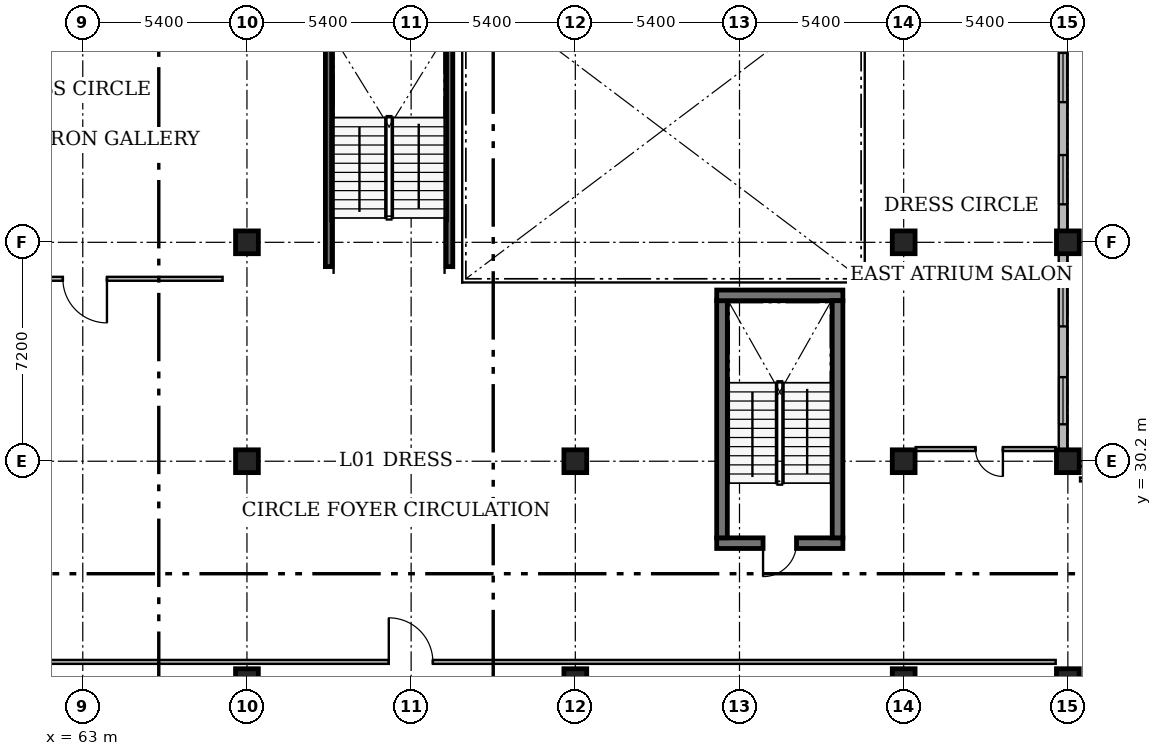
"""IFC4 building model, lengths in metres.
Left out: names, types, materials, properties, quantities, classifications, styles, units other than length and angle.
Written with IfcOpenShell. Run it as: python <this file> out.ifc"""

import sys

from ifc_helpers import new_model, si_unit, direction, frame, frame_2d, origin, origin_2d, place, context, subcontext, project, spatial, rectangle, circle, extrude, element, fill, save


model = new_model("IFC4")
c1 = context("Model", 3, precision=1e-05, world=origin(), true_north=direction((0.0, 1.0)))
c2 = subcontext(c1, "Body", "Model", "MODEL_VIEW")
j1 = project(units=[si_unit("LENGTHUNIT", "METRE"), si_unit("PLANEANGLEUNIT", "RADIAN")], contexts=[c1])
p1 = place(None, origin())
s1 = spatial("IfcSite", under=j1, at=p1, CompositionType="ELEMENT")
p2 = place(p1, origin())
s2 = spatial("IfcBuilding", under=s1, at=p2, CompositionType="ELEMENT")
p3 = place(p2, frame((0.0, 0.0, 4.8)))
s3 = spatial("IfcBuildingStorey", under=s2, at=p3, CompositionType="ELEMENT", Elevation=4.8)
for number, where, z_axis, x_axis in (
    (1, (68.4, 23.0, 0.0), (0.0, 0.0, 1.0), (1.0, 0.0, 0.0)),
    (2, (68.4, 30.2, 0.0), (0.0, 0.0, 1.0), (1.0, 0.0, 0.0)),
    (3, (68.4, 37.4, 0.0), (0.0, 0.0, 1.0), (1.0, 0.0, 0.0)),
    (4, (79.2, 23.0, 0.0), (0.0, 0.0, 1.0), (1.0, 0.0, 0.0)),
    (5, (79.2, 30.2, 0.0), (0.0, 0.0, 1.0), (1.0, 0.0, 0.0)),
    (6, (90.0, 23.0, 0.0), (0.0, 0.0, 1.0), (1.0, 0.0, 0.0)),
    (7, (90.0, 30.2, 0.0), (0.0, 0.0, 1.0), (1.0, 0.0, 0.0)),
    (8, (90.0, 37.4, 0.0), (0.0, 0.0, 1.0), (1.0, 0.0, 0.0)),
    (9, (95.4, 23.0, 0.0), (0.0, 0.0, 1.0), (1.0, 0.0, 0.0)),
    (10, (95.4, 30.2, 0.0), (0.0, 0.0, 1.0), (1.0, 0.0, 0.0)),
    (11, (95.4, 37.4, 0.0), (0.0, 0.0, 1.0), (1.0, 0.0, 0.0)),
):
    element("IfcColumn", number, at=place(p3, frame(where, z_axis=z_axis, x_axis=x_axis)), inside=s3, PredefinedType="COLUMN", context=c2, shape_type="SweptSolid", body=[
        extrude(circle(Radius=0.375, at=origin_2d()), origin(), (0.0, 0.0, 1.0), 4.2),
    ])
p4 = place(p3, frame((88.0, 27.505, 0.0), z_axis=(0.0, 0.0, 1.0), x_axis=(-1.0, 0.0, 0.0)))
e12 = element("IfcWall", 12, at=p4, inside=s3, PredefinedType="SOLIDWALL", context=c2, shape_type="SweptSolid", body=[
    extrude(rectangle(XDim=4.15, YDim=0.35, at=frame_2d((2.075, 0.0))), origin(), (0.0, 0.0, 1.0), 4.2),
])
p5 = place(p4, frame((1.525, 0.0, 0.0)))
e13 = element("IfcOpeningElement", 13, at=p5, cuts=e12, PredefinedType="OPENING", context=c2, shape_type="SweptSolid", body=[
    extrude(rectangle(XDim=1.1, YDim=2.15, at=frame_2d((0.55, 1.075))), frame((0.0, 0.195, 0.0), z_axis=(0.0, -1.0, 0.0), x_axis=(1.0, 0.0, 0.0)), (0.0, 0.0, 1.0), 0.39),
])
p6 = place(p3, frame((84.025, 27.68, 0.0), z_axis=(0.0, 0.0, 1.0), x_axis=(0.0, 1.0, 0.0)))
e14 = element("IfcWall", 14, at=p6, inside=s3, PredefinedType="SOLIDWALL", context=c2, shape_type="SweptSolid", body=[
    extrude(rectangle(XDim=7.8, YDim=0.35, at=frame_2d((3.9, 0.0))), origin(), (0.0, 0.0, 1.0), 4.2),
])
p7 = place(p3, frame((83.85, 35.655, 0.0), z_axis=(0.0, 0.0, 1.0), x_axis=(1.0, 0.0, 0.0)))
e15 = element("IfcWall", 15, at=p7, inside=s3, PredefinedType="SOLIDWALL", context=c2, shape_type="SweptSolid", body=[
    extrude(rectangle(XDim=4.15, YDim=0.35, at=frame_2d((2.075, 0.0))), origin(), (0.0, 0.0, 1.0), 4.2),
])
p8 = place(p3, frame((87.825, 35.48, 0.0), z_axis=(0.0, 0.0, 1.0), x_axis=(0.0, -1.0, 0.0)))
e16 = element("IfcWall", 16, at=p8, inside=s3, PredefinedType="SOLIDWALL", context=c2, shape_type="SweptSolid", body=[
    extrude(rectangle(XDim=7.8, YDim=0.35, at=frame_2d((3.9, 0.0))), origin(), (0.0, 0.0, 1.0), 4.2),
])
for number, where, z_axis, x_axis in (
    (17, (71.09, 36.6, 0.0), (0.0, 0.0, 1.0), (0.0, 1.0, 0.0)),
    (18, (75.06, 36.6, 0.0), (0.0, 0.0, 1.0), (0.0, 1.0, 0.0)),
):
    element("IfcWall", number, at=place(p3, frame(where, z_axis=z_axis, x_axis=x_axis)), inside=s3, PredefinedType="SOLIDWALL", context=c2, shape_type="SweptSolid", body=[
        extrude(rectangle(XDim=7.6, YDim=0.22, at=frame_2d((3.8, 0.0))), origin(), (0.0, 0.0, 1.0), 3.95),
    ])
p9 = place(p3, frame((95.24, 30.58, 0.0), z_axis=(0.0, 0.0, 1.0), x_axis=(0.0, 1.0, 0.0)))
e19 = element("IfcWall", 19, at=p9, inside=s3, PredefinedType="SOLIDWALL", context=c2, shape_type="SweptSolid", body=[
    extrude(rectangle(XDim=6.44, YDim=0.28, at=frame_2d((3.22, 0.0))), origin(), (0.0, 0.0, 1.0), 3.653),
])
p10 = place(p9, frame((0.835, 0.0, 0.95)))
e20 = element("IfcOpeningElement", 20, at=p10, cuts=e19, PredefinedType="OPENING", context=c2, shape_type="SweptSolid", body=[
    extrude(rectangle(XDim=1.55, YDim=1.8, at=frame_2d((0.775, 0.9))), frame((0.0, 0.16, 0.0), z_axis=(0.0, -1.0, 0.0), x_axis=(1.0, 0.0, 0.0)), (0.0, 0.0, 1.0), 0.32),
])
p11 = place(p9, frame((4.055, 0.0, 0.95)))
e21 = element("IfcOpeningElement", 21, at=p11, cuts=e19, PredefinedType="OPENING", context=c2, shape_type="SweptSolid", body=[
    extrude(rectangle(XDim=1.55, YDim=1.8, at=frame_2d((0.775, 0.9))), frame((0.0, 0.16, 0.0), z_axis=(0.0, -1.0, 0.0), x_axis=(1.0, 0.0, 0.0)), (0.0, 0.0, 1.0), 0.32),
])
p12 = place(p3, frame((95.24, 37.78, 0.0), z_axis=(0.0, 0.0, 1.0), x_axis=(0.0, 1.0, 0.0)))
e22 = element("IfcWall", 22, at=p12, inside=s3, PredefinedType="SOLIDWALL", context=c2, shape_type="SweptSolid", body=[
    extrude(rectangle(XDim=6.72, YDim=0.28, at=frame_2d((3.36, 0.0))), origin(), (0.0, 0.0, 1.0), 3.373),
])
p13 = place(p12, frame((0.87, 0.0, 0.95)))
e23 = element("IfcOpeningElement", 23, at=p13, cuts=e22, PredefinedType="OPENING", context=c2, shape_type="SweptSolid", body=[
    extrude(rectangle(XDim=1.62, YDim=1.75, at=frame_2d((0.81, 0.875))), frame((0.0, 0.16, 0.0), z_axis=(0.0, -1.0, 0.0), x_axis=(1.0, 0.0, 0.0)), (0.0, 0.0, 1.0), 0.32),
])
p14 = place(p12, frame((4.23, 0.0, 0.95)))
e24 = element("IfcOpeningElement", 24, at=p14, cuts=e22, PredefinedType="OPENING", context=c2, shape_type="SweptSolid", body=[
    extrude(rectangle(XDim=1.62, YDim=1.75, at=frame_2d((0.81, 0.875))), frame((0.0, 0.16, 0.0), z_axis=(0.0, -1.0, 0.0), x_axis=(1.0, 0.0, 0.0)), (0.0, 0.0, 1.0), 0.32),
])
p15 = place(p3, frame((95.8, 29.6, 0.0), z_axis=(0.0, 0.0, 1.0), x_axis=(1.0, 0.0, 0.0)))
e25 = element("IfcWall", 25, at=p15, inside=s3, PredefinedType="PARTITIONING", context=c2, shape_type="SweptSolid", body=[
    extrude(rectangle(XDim=15.2, YDim=0.13, at=frame_2d((7.6, 0.0))), origin(), (0.0, 0.0, 1.0), 3.94),
])
p16 = place(p3, frame((57.8, 23.6, 0.0), z_axis=(0.0, 0.0, 1.0), x_axis=(1.0, 0.0, 0.0)))
e26 = element("IfcWall", 26, at=p16, inside=s3, PredefinedType="PARTITIONING", context=c2, shape_type="SweptSolid", body=[
    extrude(rectangle(XDim=37.2, YDim=0.13, at=frame_2d((18.6, 0.0))), origin(), (0.0, 0.0, 1.0), 3.94),
])
p17 = place(p16, frame((15.265, 0.0, 0.0)))
e27 = element("IfcOpeningElement", 27, at=p17, cuts=e26, PredefinedType="OPENING", context=c2, shape_type="SweptSolid", body=[
    extrude(rectangle(XDim=1.45, YDim=2.2, at=frame_2d((0.725, 1.1))), frame((0.0, 0.085, 0.0), z_axis=(0.0, -1.0, 0.0), x_axis=(1.0, 0.0, 0.0)), (0.0, 0.0, 1.0), 0.17),
])
p18 = place(p3, frame((67.6, 36.2, 0.0), z_axis=(0.0, 0.0, 1.0), x_axis=(-1.0, 0.0, 0.0)))
e28 = element("IfcWall", 28, at=p18, inside=s3, PredefinedType="PARTITIONING", context=c2, shape_type="SweptSolid", body=[
    extrude(rectangle(XDim=9.8, YDim=0.13, at=frame_2d((4.9, 0.0))), origin(), (0.0, 0.0, 1.0), 3.94),
])
p19 = place(p18, frame((3.805, 0.0, 0.0)))
e29 = element("IfcOpeningElement", 29, at=p19, cuts=e28, PredefinedType="OPENING", context=c2, shape_type="SweptSolid", body=[
    extrude(rectangle(XDim=1.45, YDim=2.2, at=frame_2d((0.725, 1.1))), frame((0.0, 0.085, 0.0), z_axis=(0.0, -1.0, 0.0), x_axis=(1.0, 0.0, 0.0)), (0.0, 0.0, 1.0), 0.17),
])
p20 = place(p3, frame((95.0, 30.6, 0.0), z_axis=(0.0, 0.0, 1.0), x_axis=(-1.0, 0.0, 0.0)))
e30 = element("IfcWall", 30, at=p20, inside=s3, PredefinedType="PARTITIONING", context=c2, shape_type="SweptSolid", body=[
    extrude(rectangle(XDim=4.605, YDim=0.13, at=frame_2d((2.302, 0.0))), origin(), (0.0, 0.0, 1.0), 3.26),
])
p21 = place(p20, frame((1.737, 0.0, 0.0)))
e31 = element("IfcOpeningElement", 31, at=p21, cuts=e30, PredefinedType="OPENING", context=c2, shape_type="SweptSolid", body=[
    extrude(rectangle(XDim=0.9, YDim=2.15, at=frame_2d((0.45, 1.075))), frame((0.0, 0.085, 0.0), z_axis=(0.0, -1.0, 0.0), x_axis=(1.0, 0.0, 0.0)), (0.0, 0.0, 1.0), 0.17),
])
p22 = place(p5, origin())
e32 = element("IfcDoor", 32, at=p22, inside=s3, OperationType="SINGLE_SWING_RIGHT", PredefinedType="DOOR", context=c2, shape_type="SweptSolid", body=[
    extrude(rectangle(XDim=1.1, YDim=2.15, at=frame_2d((0.55, 1.075))), frame((0.0, 0.025, 0.0), z_axis=(0.0, -1.0, 0.0), x_axis=(1.0, 0.0, 0.0)), (0.0, 0.0, 1.0), 0.05),
])
fill(e13, e32)
p23 = place(p10, origin())
e33 = element("IfcWindow", 33, at=p23, inside=s3, PartitioningType="SINGLE_PANEL", PredefinedType="WINDOW", context=c2, shape_type="SweptSolid", body=[
    extrude(rectangle(XDim=1.55, YDim=1.8, at=frame_2d((0.775, 0.9))), frame((0.0, 0.03, 0.0), z_axis=(0.0, -1.0, 0.0), x_axis=(1.0, 0.0, 0.0)), (0.0, 0.0, 1.0), 0.06),
])
fill(e20, e33)
p24 = place(p11, origin())
e34 = element("IfcWindow", 34, at=p24, inside=s3, PartitioningType="SINGLE_PANEL", PredefinedType="WINDOW", context=c2, shape_type="SweptSolid", body=[
    extrude(rectangle(XDim=1.55, YDim=1.8, at=frame_2d((0.775, 0.9))), frame((0.0, 0.03, 0.0), z_axis=(0.0, -1.0, 0.0), x_axis=(1.0, 0.0, 0.0)), (0.0, 0.0, 1.0), 0.06),
])
fill(e21, e34)
p25 = place(p13, origin())
e35 = element("IfcWindow", 35, at=p25, inside=s3, PartitioningType="SINGLE_PANEL", PredefinedType="WINDOW", context=c2, shape_type="SweptSolid", body=[
    extrude(rectangle(XDim=1.62, YDim=1.75, at=frame_2d((0.81, 0.875))), frame((0.0, 0.03, 0.0), z_axis=(0.0, -1.0, 0.0), x_axis=(1.0, 0.0, 0.0)), (0.0, 0.0, 1.0), 0.06),
])
fill(e23, e35)
p26 = place(p14, origin())
e36 = element("IfcWindow", 36, at=p26, inside=s3, PartitioningType="SINGLE_PANEL", PredefinedType="WINDOW", context=c2, shape_type="SweptSolid", body=[
    extrude(rectangle(XDim=1.62, YDim=1.75, at=frame_2d((0.81, 0.875))), frame((0.0, 0.03, 0.0), z_axis=(0.0, -1.0, 0.0), x_axis=(1.0, 0.0, 0.0)), (0.0, 0.0, 1.0), 0.06),
])
fill(e24, e36)
p27 = place(p17, origin())
e37 = element("IfcDoor", 37, at=p27, inside=s3, OperationType="DOUBLE_DOOR_SINGLE_SWING", PredefinedType="DOOR", context=c2, shape_type="SweptSolid", body=[
    extrude(rectangle(XDim=1.45, YDim=2.2, at=frame_2d((0.725, 1.1))), frame((0.0, 0.025, 0.0), z_axis=(0.0, -1.0, 0.0), x_axis=(1.0, 0.0, 0.0)), (0.0, 0.0, 1.0), 0.05),
])
fill(e27, e37)
p28 = place(p19, origin())
e38 = element("IfcDoor", 38, at=p28, inside=s3, OperationType="DOUBLE_DOOR_SINGLE_SWING", PredefinedType="DOOR", context=c2, shape_type="SweptSolid", body=[
    extrude(rectangle(XDim=1.45, YDim=2.2, at=frame_2d((0.725, 1.1))), frame((0.0, 0.025, 0.0), z_axis=(0.0, -1.0, 0.0), x_axis=(1.0, 0.0, 0.0)), (0.0, 0.0, 1.0), 0.05),
])
fill(e29, e38)
p29 = place(p21, origin())
e39 = element("IfcDoor", 39, at=p29, inside=s3, OperationType="SINGLE_SWING_LEFT", PredefinedType="DOOR", context=c2, shape_type="SweptSolid", body=[
    extrude(rectangle(XDim=0.9, YDim=2.15, at=frame_2d((0.45, 1.075))), frame((0.0, 0.025, 0.0), z_axis=(0.0, -1.0, 0.0), x_axis=(1.0, 0.0, 0.0)), (0.0, 0.0, 1.0), 0.05),
])
fill(e31, e39)
save(model, sys.argv[1])
